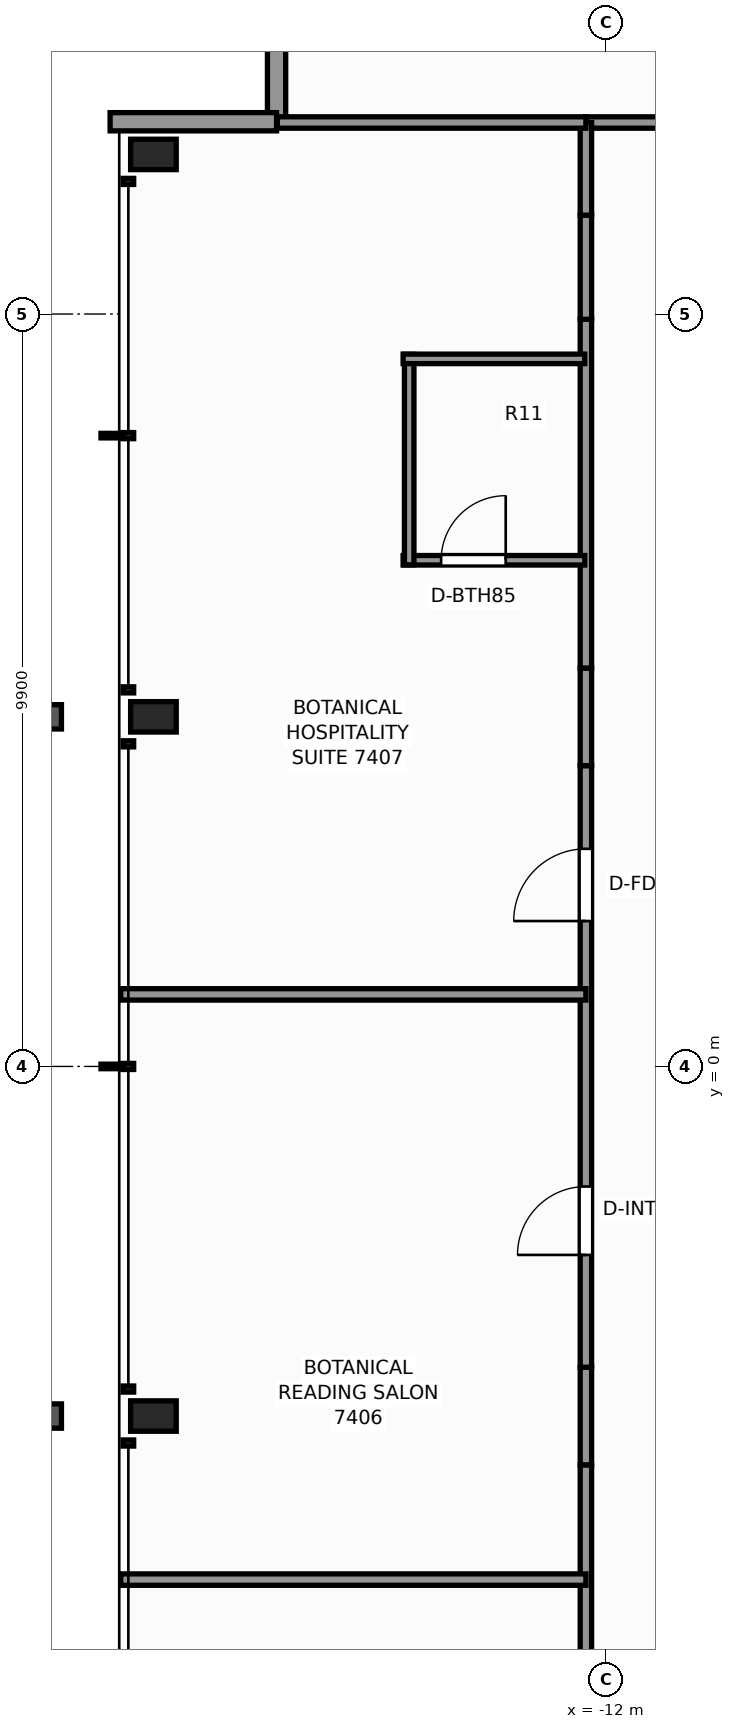
"""IFC4 building model, lengths in metres.
Left out: names, types, materials, properties, quantities, classifications, styles, units other than length and angle.
Written with IfcOpenShell. Run it as: python <this file> out.ifc"""

import sys

from ifc_helpers import new_model, si_unit, direction, frame, frame_2d, origin, origin_2d, place, context, subcontext, project, spatial, rectangle, extrude, element, fill, save


model = new_model("IFC4")
c1 = context("Model", 3, precision=1e-05, world=origin(), true_north=direction((0.0, 1.0)))
c2 = subcontext(c1, "Body", "Model", "MODEL_VIEW")
j1 = project(units=[si_unit("LENGTHUNIT", "METRE"), si_unit("PLANEANGLEUNIT", "RADIAN")], contexts=[c1])
p1 = place(None, origin())
s1 = spatial("IfcSite", under=j1, at=p1, CompositionType="ELEMENT")
p2 = place(p1, origin())
s2 = spatial("IfcBuilding", under=s1, at=p2, CompositionType="ELEMENT")
p3 = place(p2, frame((0.0, 0.0, 254.9)))
s3 = spatial("IfcBuildingStorey", under=s2, at=p3, CompositionType="ELEMENT", Elevation=254.9)
for number, where, z_axis, x_axis in (
    (1, (-17.95, -4.6, 0.0), (0.0, 0.0, 1.0), (1.0, 0.0, 0.0)),
    (2, (-17.95, 4.6, 0.0), (0.0, 0.0, 1.0), (1.0, 0.0, 0.0)),
    (3, (-17.95, 12.0, 0.0), (0.0, 0.0, 1.0), (1.0, 0.0, 0.0)),
):
    element("IfcColumn", number, at=place(p3, frame(where, z_axis=z_axis, x_axis=x_axis)), inside=s3, PredefinedType="COLUMN", context=c2, shape_type="SweptSolid", body=[
        extrude(rectangle(XDim=0.6, YDim=0.4, at=origin_2d()), origin(), (0.0, 0.0, 1.0), 3.5),
    ])
p4 = place(p3, frame((-16.33, 12.43, 0.0), z_axis=(0.0, 0.0, 1.0), x_axis=(0.0, 1.0, 0.0)))
e4 = element("IfcWall", 4, at=p4, inside=s3, PredefinedType="STANDARD", context=c2, shape_type="SweptSolid", body=[
    extrude(rectangle(XDim=2.19, YDim=0.24, at=frame_2d((1.095, 0.0))), origin(), (0.0, 0.0, 1.0), 2.603),
])
p5 = place(p3, frame((-18.52, 12.43, 0.0), z_axis=(0.0, 0.0, 1.0), x_axis=(1.0, 0.0, 0.0)))
e5 = element("IfcWall", 5, at=p5, inside=s3, PredefinedType="STANDARD", context=c2, shape_type="SweptSolid", body=[
    extrude(rectangle(XDim=2.19, YDim=0.24, at=frame_2d((1.095, 0.0))), origin(), (0.0, 0.0, 1.0), 1.415),
])
p6 = place(p3, frame((-12.26, 12.42, 0.0), z_axis=(0.0, 0.0, 1.0), x_axis=(1.0, 0.0, 0.0)))
e6 = element("IfcWall", 6, at=p6, inside=s3, PredefinedType="PARTITIONING", context=c2, shape_type="SweptSolid", body=[
    extrude(rectangle(XDim=1.018, YDim=0.15, at=frame_2d((0.509, 0.0))), origin(), (0.0, 0.0, 1.0), 3.22),
])
p7 = place(p3, frame((-12.26, -9.83, 0.0), z_axis=(0.0, 0.0, 1.0), x_axis=(0.0, 1.0, 0.0)))
e7 = element("IfcWall", 7, at=p7, inside=s3, PredefinedType="PARTITIONING", context=c2, shape_type="SweptSolid", body=[
    extrude(rectangle(XDim=4.588, YDim=0.15, at=frame_2d((2.294, 0.0))), origin(), (0.0, 0.0, 1.0), 3.22),
])
p8 = place(p7, frame((0.952, 0.0, 0.0)))
e8 = element("IfcOpeningElement", 8, at=p8, cuts=e7, PredefinedType="OPENING", context=c2, shape_type="SweptSolid", body=[
    extrude(rectangle(XDim=0.9, YDim=2.06, at=frame_2d((0.45, 1.03))), frame((0.0, 0.085, 0.0), z_axis=(0.0, -1.0, 0.0), x_axis=(1.0, 0.0, 0.0)), (0.0, 0.0, 1.0), 0.17),
])
p9 = place(p3, frame((-12.26, -5.242, 0.0), z_axis=(0.0, 0.0, 1.0), x_axis=(0.0, 1.0, 0.0)))
e9 = element("IfcWall", 9, at=p9, inside=s3, PredefinedType="PARTITIONING", context=c2, shape_type="SweptSolid", body=[
    extrude(rectangle(XDim=1.284, YDim=0.15, at=frame_2d((0.642, 0.0))), origin(), (0.0, 0.0, 1.0), 1.405),
])
p10 = place(p3, frame((-12.26, -3.958, 0.0), z_axis=(0.0, 0.0, 1.0), x_axis=(0.0, 1.0, 0.0)))
e10 = element("IfcWall", 10, at=p10, inside=s3, PredefinedType="PARTITIONING", context=c2, shape_type="SweptSolid", body=[
    extrude(rectangle(XDim=7.916, YDim=0.15, at=frame_2d((3.958, 0.0))), origin(), (0.0, 0.0, 1.0), 2.745),
])
p11 = place(p10, frame((1.478, 0.0, 0.0)))
e11 = element("IfcOpeningElement", 11, at=p11, cuts=e10, PredefinedType="OPENING", context=c2, shape_type="SweptSolid", body=[
    extrude(rectangle(XDim=0.9, YDim=2.06, at=frame_2d((0.45, 1.03))), frame((0.0, 0.085, 0.0), z_axis=(0.0, -1.0, 0.0), x_axis=(1.0, 0.0, 0.0)), (0.0, 0.0, 1.0), 0.17),
])
p12 = place(p10, frame((5.871, 0.0, 0.0)))
e12 = element("IfcOpeningElement", 12, at=p12, cuts=e10, PredefinedType="OPENING", context=c2, shape_type="SweptSolid", body=[
    extrude(rectangle(XDim=0.95, YDim=2.06, at=frame_2d((0.475, 1.03))), frame((0.0, 0.085, 0.0), z_axis=(0.0, -1.0, 0.0), x_axis=(1.0, 0.0, 0.0)), (0.0, 0.0, 1.0), 0.17),
])
p13 = place(p3, frame((-12.26, 3.958, 0.0), z_axis=(0.0, 0.0, 1.0), x_axis=(0.0, 1.0, 0.0)))
e13 = element("IfcWall", 13, at=p13, inside=s3, PredefinedType="PARTITIONING", context=c2, shape_type="SweptSolid", body=[
    extrude(rectangle(XDim=1.284, YDim=0.15, at=frame_2d((0.642, 0.0))), origin(), (0.0, 0.0, 1.0), 1.405),
])
p14 = place(p3, frame((-12.26, 5.242, 0.0), z_axis=(0.0, 0.0, 1.0), x_axis=(0.0, 1.0, 0.0)))
e14 = element("IfcWall", 14, at=p14, inside=s3, PredefinedType="PARTITIONING", context=c2, shape_type="SweptSolid", body=[
    extrude(rectangle(XDim=4.588, YDim=0.15, at=frame_2d((2.294, 0.0))), origin(), (0.0, 0.0, 1.0), 3.22),
])
p15 = place(p3, frame((-12.26, 9.83, 0.0), z_axis=(0.0, 0.0, 1.0), x_axis=(0.0, 1.0, 0.0)))
e15 = element("IfcWall", 15, at=p15, inside=s3, PredefinedType="PARTITIONING", context=c2, shape_type="SweptSolid", body=[
    extrude(rectangle(XDim=1.37, YDim=0.15, at=frame_2d((0.685, 0.0))), origin(), (0.0, 0.0, 1.0), 1.405),
])
p16 = place(p3, frame((-12.26, 11.201, 0.0), z_axis=(0.0, 0.0, 1.0), x_axis=(0.0, 1.0, 0.0)))
e16 = element("IfcWall", 16, at=p16, inside=s3, PredefinedType="PARTITIONING", context=c2, shape_type="SweptSolid", body=[
    extrude(rectangle(XDim=1.219, YDim=0.15, at=frame_2d((0.61, 0.0))), origin(), (0.0, 0.0, 1.0), 3.22),
])
p17 = place(p3, frame((-16.32, 12.42, 0.0), z_axis=(0.0, 0.0, 1.0), x_axis=(1.0, 0.0, 0.0)))
e17 = element("IfcWall", 17, at=p17, inside=s3, PredefinedType="PARTITIONING", context=c2, shape_type="SweptSolid", body=[
    extrude(rectangle(XDim=4.06, YDim=0.15, at=frame_2d((2.03, 0.0))), origin(), (0.0, 0.0, 1.0), 3.22),
])
for number, where, z_axis, x_axis in (
    (18, (-18.38, -6.752, 0.0), (0.0, 0.0, 1.0), (1.0, 0.0, 0.0)),
    (19, (-18.38, 0.948, 0.0), (0.0, 0.0, 1.0), (1.0, 0.0, 0.0)),
):
    element("IfcWall", number, at=place(p3, frame(where, z_axis=z_axis, x_axis=x_axis)), inside=s3, PredefinedType="PARTITIONING", context=c2, shape_type="SweptSolid", body=[
        extrude(rectangle(XDim=6.12, YDim=0.15, at=frame_2d((3.06, 0.0))), origin(), (0.0, 0.0, 1.0), 2.593),
    ])
p18 = place(p3, frame((-14.665, 6.66, 0.0), z_axis=(0.0, 0.0, 1.0), x_axis=(1.0, 0.0, 0.0)))
e20 = element("IfcWall", 20, at=p18, inside=s3, PredefinedType="PARTITIONING", context=c2, shape_type="SweptSolid", body=[
    extrude(rectangle(XDim=2.39, YDim=0.125, at=frame_2d((1.195, 0.0))), origin(), (0.0, 0.0, 1.0), 3.22),
])
p19 = place(p18, frame((0.5, 0.0, 0.0)))
e21 = element("IfcOpeningElement", 21, at=p19, cuts=e20, PredefinedType="OPENING", context=c2, shape_type="SweptSolid", body=[
    extrude(rectangle(XDim=0.85, YDim=2.03, at=frame_2d((0.425, 1.015))), frame((0.0, 0.073, 0.0), z_axis=(0.0, -1.0, 0.0), x_axis=(1.0, 0.0, 0.0)), (0.0, 0.0, 1.0), 0.145),
])
p20 = place(p3, frame((-14.585, 6.6, 0.0), z_axis=(0.0, 0.0, 1.0), x_axis=(0.0, 1.0, 0.0)))
e22 = element("IfcWall", 22, at=p20, inside=s3, PredefinedType="PARTITIONING", context=c2, shape_type="SweptSolid", body=[
    extrude(rectangle(XDim=2.77, YDim=0.125, at=frame_2d((1.385, 0.0))), origin(), (0.0, 0.0, 1.0), 3.22),
])
p21 = place(p3, frame((-14.665, 9.31, 0.0), z_axis=(0.0, 0.0, 1.0), x_axis=(1.0, 0.0, 0.0)))
e23 = element("IfcWall", 23, at=p21, inside=s3, PredefinedType="PARTITIONING", context=c2, shape_type="SweptSolid", body=[
    extrude(rectangle(XDim=2.39, YDim=0.125, at=frame_2d((1.195, 0.0))), origin(), (0.0, 0.0, 1.0), 3.22),
])
p22 = place(p11, origin())
e24 = element("IfcDoor", 24, at=p22, inside=s3, OperationType="SINGLE_SWING_LEFT", PredefinedType="DOOR", context=c2, shape_type="SweptSolid", body=[
    extrude(rectangle(XDim=0.9, YDim=2.06, at=frame_2d((0.45, 1.03))), frame((0.0, 0.025, 0.0), z_axis=(0.0, -1.0, 0.0), x_axis=(1.0, 0.0, 0.0)), (0.0, 0.0, 1.0), 0.05),
])
fill(e11, e24)
p23 = place(p19, origin())
e25 = element("IfcDoor", 25, at=p23, inside=s3, OperationType="SINGLE_SWING_RIGHT", PredefinedType="DOOR", context=c2, shape_type="SweptSolid", body=[
    extrude(rectangle(XDim=0.85, YDim=2.03, at=frame_2d((0.425, 1.015))), frame((0.0, 0.025, 0.0), z_axis=(0.0, -1.0, 0.0), x_axis=(1.0, 0.0, 0.0)), (0.0, 0.0, 1.0), 0.05),
])
fill(e21, e25)
p24 = place(p12, origin())
e26 = element("IfcDoor", 26, at=p24, inside=s3, OperationType="SINGLE_SWING_LEFT", PredefinedType="DOOR", context=c2, shape_type="SweptSolid", body=[
    extrude(rectangle(XDim=0.95, YDim=2.06, at=frame_2d((0.475, 1.03))), frame((0.0, 0.025, 0.0), z_axis=(0.0, -1.0, 0.0), x_axis=(1.0, 0.0, 0.0)), (0.0, 0.0, 1.0), 0.05),
])
fill(e12, e26)
save(model, sys.argv[1])
